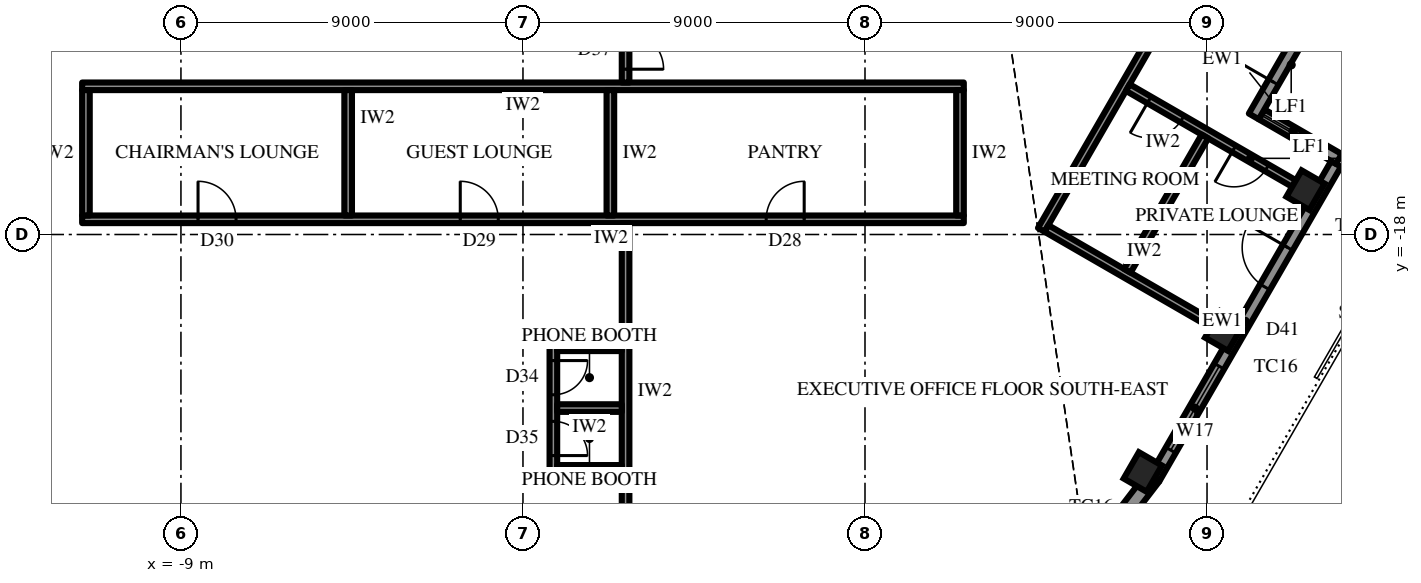
"""IFC4 building model, lengths in metres.
Left out: names, types, materials, properties, quantities, classifications, styles, units other than length and angle.
Written with IfcOpenShell. Run it as: python <this file> out.ifc"""

import sys

from ifc_helpers import new_model, si_unit, direction, frame, frame_2d, origin, origin_2d, place, context, subcontext, project, spatial, polyline, rectangle, outline, extrude, element, fill, save


model = new_model("IFC4")
c1 = context("Model", 3, precision=1e-05, world=origin(), true_north=direction((0.0, 1.0)))
c2 = subcontext(c1, "Body", "Model", "MODEL_VIEW")
j1 = project(units=[si_unit("LENGTHUNIT", "METRE"), si_unit("PLANEANGLEUNIT", "RADIAN")], contexts=[c1])
p1 = place(None, origin())
s1 = spatial("IfcSite", under=j1, at=p1, CompositionType="ELEMENT")
p2 = place(p1, origin())
s2 = spatial("IfcBuilding", under=s1, at=p2, CompositionType="ELEMENT")
p3 = place(p2, frame((0.0, 0.0, 382.9)))
s3 = spatial("IfcBuildingStorey", under=s2, at=p3, CompositionType="ELEMENT", Elevation=382.9)
for number, where, z_axis, x_axis in (
    (1, (16.31, -24.25, 0.0), (0.0, 0.0, 1.0), (0.5, 0.866, 0.0)),
    (2, (18.451, -20.542, 0.0), (0.0, 0.0, 1.0), (0.5, 0.866, 0.0)),
    (3, (20.592, -16.833, 0.0), (0.0, 0.0, 1.0), (0.5, 0.866, 0.0)),
):
    element("IfcColumn", number, at=place(p3, frame(where, z_axis=z_axis, x_axis=x_axis)), inside=s3, PredefinedType="COLUMN", context=c2, shape_type="SweptSolid", body=[
        extrude(rectangle(XDim=0.8, YDim=0.7, at=origin_2d()), origin(), (0.0, 0.0, 1.0), 4.2),
    ])
p4 = place(p3, origin())
e4 = element("IfcWall", 4, at=p4, inside=s3, PredefinedType="SOLIDWALL", context=c2, shape_type="SweptSolid", body=[
    extrude(outline(polyline([(12.846, -26.75), (14.011, -26.597), (15.096, -26.147), (16.028, -25.432), (16.743, -24.5), (16.397, -24.3), (15.745, -25.149), (14.896, -25.801), (13.907, -26.21), (12.846, -26.35), (12.846, -26.75)])), origin(), (0.0, 0.0, 1.0), 2.9),
])
p5 = place(p3, frame((16.613, -24.425, 0.0), z_axis=(0.0, 0.0, 1.0), x_axis=(0.499996453679, 0.866027451244, 0.0)))
e5 = element("IfcWall", 5, at=p5, inside=s3, PredefinedType="SOLIDWALL", context=c2, shape_type="SweptSolid", body=[
    extrude(rectangle(XDim=9.564, YDim=0.3, at=frame_2d((4.782, 0.0))), origin(), (0.0, 0.0, 1.0), 2.9),
])
p6 = place(p5, frame((0.866, 0.0, 0.6)))
e6 = element("IfcOpeningElement", 6, at=p6, cuts=e5, PredefinedType="OPENING", context=c2, shape_type="SweptSolid", body=[
    extrude(rectangle(XDim=2.55, YDim=2.05, at=frame_2d((1.275, 1.025))), frame((0.0, 0.16, 0.0), z_axis=(0.0, -1.0, 0.0), x_axis=(1.0, 0.0, 0.0)), (0.0, 0.0, 1.0), 0.32),
])
p7 = place(p5, frame((5.823, 0.0, 0.0)))
e7 = element("IfcOpeningElement", 7, at=p7, cuts=e5, PredefinedType="OPENING", context=c2, shape_type="SweptSolid", body=[
    extrude(rectangle(XDim=1.2, YDim=2.4, at=frame_2d((0.6, 1.2))), frame((0.0, 0.16, 0.0), z_axis=(0.0, -1.0, 0.0), x_axis=(1.0, 0.0, 0.0)), (0.0, 0.0, 1.0), 0.32),
])
p8 = place(p3, frame((21.47, -16.012, 0.0), z_axis=(0.0, 0.0, 1.0), x_axis=(-0.866016039709, 0.500016218704, 0.0)))
e8 = element("IfcWall", 8, at=p8, inside=s3, PredefinedType="SOLIDWALL", context=c2, shape_type="SweptSolid", body=[
    extrude(rectangle(XDim=2.35, YDim=0.3, at=frame_2d((1.175, 0.0))), origin(), (0.0, 0.0, 1.0), 2.9),
])
p9 = place(p3, frame((19.23, -14.892, 0.0), z_axis=(0.0, 0.0, 1.0), x_axis=(0.499999339774, 0.866025784966, 0.0)))
e9 = element("IfcWall", 9, at=p9, inside=s3, PredefinedType="SOLIDWALL", context=c2, shape_type="SweptSolid", body=[
    extrude(rectangle(XDim=6.564, YDim=0.3, at=frame_2d((3.282, 0.0))), origin(), (0.0, 0.0, 1.0), 2.9),
])
p10 = place(p9, frame((1.041, 0.0, 0.0)))
e10 = element("IfcOpeningElement", 10, at=p10, cuts=e9, PredefinedType="OPENING", context=c2, shape_type="SweptSolid", body=[
    extrude(rectangle(XDim=1.2, YDim=2.4, at=frame_2d((0.6, 1.2))), frame((0.0, 0.16, 0.0), z_axis=(0.0, -1.0, 0.0), x_axis=(1.0, 0.0, 0.0)), (0.0, 0.0, 1.0), 0.32),
])
p11 = place(p3, frame((11.6, -14.1, 0.0), z_axis=(0.0, 0.0, 1.0), x_axis=(-1.0, 0.0, 0.0)))
e11 = element("IfcWall", 11, at=p11, inside=s3, PredefinedType="PARTITIONING", context=c2, shape_type="SweptSolid", body=[
    extrude(rectangle(XDim=23.2, YDim=0.2, at=frame_2d((11.6, 0.0))), origin(), (0.0, 0.0, 1.0), 4.0),
])
p12 = place(p3, frame((11.6, -17.6, 0.0), z_axis=(0.0, 0.0, 1.0), x_axis=(-1.0, 0.0, 0.0)))
e12 = element("IfcWall", 12, at=p12, inside=s3, PredefinedType="PARTITIONING", context=c2, shape_type="SweptSolid", body=[
    extrude(rectangle(XDim=23.2, YDim=0.2, at=frame_2d((11.6, 0.0))), origin(), (0.0, 0.0, 1.0), 4.0),
])
p13 = place(p12, frame((4.2, 0.0, 0.0)))
e13 = element("IfcOpeningElement", 13, at=p13, cuts=e12, PredefinedType="OPENING", context=c2, shape_type="SweptSolid", body=[
    extrude(rectangle(XDim=1.0, YDim=2.2, at=frame_2d((0.5, 1.1))), frame((0.0, 0.11, 0.0), z_axis=(0.0, -1.0, 0.0), x_axis=(1.0, 0.0, 0.0)), (0.0, 0.0, 1.0), 0.22),
])
p14 = place(p12, frame((12.25, 0.0, 0.0)))
e14 = element("IfcOpeningElement", 14, at=p14, cuts=e12, PredefinedType="OPENING", context=c2, shape_type="SweptSolid", body=[
    extrude(rectangle(XDim=1.0, YDim=2.2, at=frame_2d((0.5, 1.1))), frame((0.0, 0.11, 0.0), z_axis=(0.0, -1.0, 0.0), x_axis=(1.0, 0.0, 0.0)), (0.0, 0.0, 1.0), 0.22),
])
p15 = place(p12, frame((19.15, 0.0, 0.0)))
e15 = element("IfcOpeningElement", 15, at=p15, cuts=e12, PredefinedType="OPENING", context=c2, shape_type="SweptSolid", body=[
    extrude(rectangle(XDim=1.0, YDim=2.2, at=frame_2d((0.5, 1.1))), frame((0.0, 0.11, 0.0), z_axis=(0.0, -1.0, 0.0), x_axis=(1.0, 0.0, 0.0)), (0.0, 0.0, 1.0), 0.22),
])
for number, where, z_axis, x_axis in (
    (16, (11.5, -14.2, 0.0), (0.0, 0.0, 1.0), (0.0, -1.0, 0.0)),
    (17, (2.3, -14.2, 0.0), (0.0, 0.0, 1.0), (0.0, -1.0, 0.0)),
    (18, (-4.6, -14.2, 0.0), (0.0, 0.0, 1.0), (0.0, -1.0, 0.0)),
    (19, (-11.5, -14.2, 0.0), (0.0, 0.0, 1.0), (0.0, -1.0, 0.0)),
):
    element("IfcWall", number, at=place(p3, frame(where, z_axis=z_axis, x_axis=x_axis)), inside=s3, PredefinedType="PARTITIONING", context=c2, shape_type="SweptSolid", body=[
        extrude(rectangle(XDim=3.3, YDim=0.2, at=frame_2d((1.65, 0.0))), origin(), (0.0, 0.0, 1.0), 4.0),
    ])
p16 = place(p3, frame((13.638, -17.878, 0.0), z_axis=(0.0, 0.0, 1.0), x_axis=(0.500006217173, 0.866021814268, 0.0)))
e20 = element("IfcWall", 20, at=p16, inside=s3, PredefinedType="PARTITIONING", context=c2, shape_type="SweptSolid", body=[
    extrude(rectangle(XDim=17.328, YDim=0.2, at=frame_2d((8.664, 0.0))), origin(), (0.0, 0.0, 1.0), 4.0),
])
p17 = place(p16, frame((8.164, 0.0, 0.0)))
e21 = element("IfcOpeningElement", 21, at=p17, cuts=e20, PredefinedType="OPENING", context=c2, shape_type="SweptSolid", body=[
    extrude(rectangle(XDim=1.0, YDim=2.2, at=frame_2d((0.5, 1.1))), frame((0.0, 0.11, 0.0), z_axis=(0.0, -1.0, 0.0), x_axis=(1.0, 0.0, 0.0)), (0.0, 0.0, 1.0), 0.22),
])
p18 = place(p3, frame((13.775, -17.842, 0.0), z_axis=(0.0, 0.0, 1.0), x_axis=(0.866006046928, -0.500033525561, 0.0)))
e22 = element("IfcWall", 22, at=p18, inside=s3, PredefinedType="PARTITIONING", context=c2, shape_type="SweptSolid", body=[
    extrude(rectangle(XDim=5.05, YDim=0.2, at=frame_2d((2.525, 0.0))), origin(), (0.0, 0.0, 1.0), 3.082),
])
p19 = place(p3, frame((15.916, -14.133, 0.0), z_axis=(0.0, 0.0, 1.0), x_axis=(0.866018134068, -0.500012591307, 0.0)))
e23 = element("IfcWall", 23, at=p19, inside=s3, PredefinedType="PARTITIONING", context=c2, shape_type="SweptSolid", body=[
    extrude(rectangle(XDim=5.05, YDim=0.2, at=frame_2d((2.525, 0.0))), origin(), (0.0, 0.0, 1.0), 3.082),
])
p20 = place(p19, frame((0.65, 0.0, 0.0)))
e24 = element("IfcOpeningElement", 24, at=p20, cuts=e23, PredefinedType="OPENING", context=c2, shape_type="SweptSolid", body=[
    extrude(rectangle(XDim=1.0, YDim=2.2, at=frame_2d((0.5, 1.1))), frame((0.0, 0.11, 0.0), z_axis=(0.0, -1.0, 0.0), x_axis=(1.0, 0.0, 0.0)), (0.0, 0.0, 1.0), 0.22),
])
p21 = place(p19, frame((3.225, 0.0, 0.0)))
e25 = element("IfcOpeningElement", 25, at=p21, cuts=e23, PredefinedType="OPENING", context=c2, shape_type="SweptSolid", body=[
    extrude(rectangle(XDim=1.0, YDim=2.2, at=frame_2d((0.5, 1.1))), frame((0.0, 0.11, 0.0), z_axis=(0.0, -1.0, 0.0), x_axis=(1.0, 0.0, 0.0)), (0.0, 0.0, 1.0), 0.22),
])
p22 = place(p3, frame((15.903, -18.955, 0.0), z_axis=(0.0, 0.0, 1.0), x_axis=(0.499998569178, 0.866026229868, 0.0)))
e26 = element("IfcWall", 26, at=p22, inside=s3, PredefinedType="PARTITIONING", context=c2, shape_type="SweptSolid", body=[
    extrude(rectangle(XDim=4.082, YDim=0.2, at=frame_2d((2.041, 0.0))), origin(), (0.0, 0.0, 1.0), 4.0),
])
p23 = place(p3, frame((2.7, -12.3, 0.0), z_axis=(0.0, 0.0, 1.0), x_axis=(0.0, -1.0, 0.0)))
e27 = element("IfcWall", 27, at=p23, inside=s3, PredefinedType="PARTITIONING", context=c2, shape_type="SweptSolid", body=[
    extrude(rectangle(XDim=1.7, YDim=0.2, at=frame_2d((0.85, 0.0))), origin(), (0.0, 0.0, 1.0), 4.0),
])
p24 = place(p23, frame((0.35, 0.0, 0.0)))
e28 = element("IfcOpeningElement", 28, at=p24, cuts=e27, PredefinedType="OPENING", context=c2, shape_type="SweptSolid", body=[
    extrude(rectangle(XDim=1.0, YDim=2.2, at=frame_2d((0.5, 1.1))), frame((0.0, 0.11, 0.0), z_axis=(0.0, -1.0, 0.0), x_axis=(1.0, 0.0, 0.0)), (0.0, 0.0, 1.0), 0.22),
])
p25 = place(p3, frame((2.7, -17.7, 0.0), z_axis=(0.0, 0.0, 1.0), x_axis=(0.0, -1.0, 0.0)))
e29 = element("IfcWall", 29, at=p25, inside=s3, PredefinedType="PARTITIONING", context=c2, shape_type="SweptSolid", body=[
    extrude(rectangle(XDim=8.85, YDim=0.2, at=frame_2d((4.425, 0.0))), origin(), (0.0, 0.0, 1.0), 4.0),
])
p26 = place(p3, frame((0.8, -20.867, 0.0), z_axis=(0.0, 0.0, 1.0), x_axis=(0.0, -1.0, 0.0)))
e30 = element("IfcWall", 30, at=p26, inside=s3, PredefinedType="PARTITIONING", context=c2, shape_type="SweptSolid", body=[
    extrude(rectangle(XDim=3.4, YDim=0.2, at=frame_2d((1.7, 0.0))), origin(), (0.0, 0.0, 1.0), 4.0),
])
p27 = place(p26, frame((0.45, 0.0, 0.0)))
e31 = element("IfcOpeningElement", 31, at=p27, cuts=e30, PredefinedType="OPENING", context=c2, shape_type="SweptSolid", body=[
    extrude(rectangle(XDim=0.9, YDim=2.2, at=frame_2d((0.45, 1.1))), frame((0.0, 0.11, 0.0), z_axis=(0.0, -1.0, 0.0), x_axis=(1.0, 0.0, 0.0)), (0.0, 0.0, 1.0), 0.22),
])
p28 = place(p26, frame((2.05, 0.0, 0.0)))
e32 = element("IfcOpeningElement", 32, at=p28, cuts=e30, PredefinedType="OPENING", context=c2, shape_type="SweptSolid", body=[
    extrude(rectangle(XDim=0.9, YDim=2.2, at=frame_2d((0.45, 1.1))), frame((0.0, 0.11, 0.0), z_axis=(0.0, -1.0, 0.0), x_axis=(1.0, 0.0, 0.0)), (0.0, 0.0, 1.0), 0.22),
])
for number, where, z_axis, x_axis in (
    (33, (2.6, -20.968, 0.0), (0.0, 0.0, 1.0), (-1.0, 0.0, 0.0)),
    (34, (2.6, -22.567, 0.0), (0.0, 0.0, 1.0), (-1.0, 0.0, 0.0)),
    (35, (2.6, -24.167, 0.0), (0.0, 0.0, 1.0), (-1.0, 0.0, 0.0)),
):
    element("IfcWall", number, at=place(p3, frame(where, z_axis=z_axis, x_axis=x_axis)), inside=s3, PredefinedType="PARTITIONING", context=c2, shape_type="SweptSolid", body=[
        extrude(rectangle(XDim=1.7, YDim=0.2, at=frame_2d((0.85, 0.0))), origin(), (0.0, 0.0, 1.0), 4.0),
    ])
p29 = place(p6, origin())
e36 = element("IfcWindow", 36, at=p29, inside=s3, PartitioningType="SINGLE_PANEL", PredefinedType="WINDOW", context=c2, shape_type="SweptSolid", body=[
    extrude(rectangle(XDim=2.55, YDim=2.05, at=frame_2d((1.275, 1.025))), frame((0.0, 0.03, 0.0), z_axis=(0.0, -1.0, 0.0), x_axis=(1.0, 0.0, 0.0)), (0.0, 0.0, 1.0), 0.06),
])
fill(e6, e36)
p30 = place(p7, origin())
e37 = element("IfcDoor", 37, at=p30, inside=s3, OperationType="SINGLE_SWING_LEFT", PredefinedType="DOOR", context=c2, shape_type="SweptSolid", body=[
    extrude(rectangle(XDim=1.2, YDim=2.4, at=frame_2d((0.6, 1.2))), frame((0.0, 0.025, 0.0), z_axis=(0.0, -1.0, 0.0), x_axis=(1.0, 0.0, 0.0)), (0.0, 0.0, 1.0), 0.05),
])
fill(e7, e37)
p31 = place(p10, origin())
e38 = element("IfcDoor", 38, at=p31, inside=s3, OperationType="SINGLE_SWING_RIGHT", PredefinedType="DOOR", context=c2, shape_type="SweptSolid", body=[
    extrude(rectangle(XDim=1.2, YDim=2.4, at=frame_2d((0.6, 1.2))), frame((0.0, 0.025, 0.0), z_axis=(0.0, -1.0, 0.0), x_axis=(1.0, 0.0, 0.0)), (0.0, 0.0, 1.0), 0.05),
])
fill(e10, e38)
p32 = place(p13, frame((1.0, 0.0, 0.0), z_axis=(0.0, 0.0, 1.0), x_axis=(-1.0, 0.0, 0.0)))
e39 = element("IfcDoor", 39, at=p32, inside=s3, OperationType="SINGLE_SWING_LEFT", PredefinedType="DOOR", context=c2, shape_type="SweptSolid", body=[
    extrude(rectangle(XDim=1.0, YDim=2.2, at=frame_2d((0.5, 1.1))), frame((0.0, 0.025, 0.0), z_axis=(0.0, -1.0, 0.0), x_axis=(1.0, 0.0, 0.0)), (0.0, 0.0, 1.0), 0.05),
])
fill(e13, e39)
p33 = place(p14, frame((1.0, 0.0, 0.0), z_axis=(0.0, 0.0, 1.0), x_axis=(-1.0, 0.0, 0.0)))
e40 = element("IfcDoor", 40, at=p33, inside=s3, OperationType="SINGLE_SWING_RIGHT", PredefinedType="DOOR", context=c2, shape_type="SweptSolid", body=[
    extrude(rectangle(XDim=1.0, YDim=2.2, at=frame_2d((0.5, 1.1))), frame((0.0, 0.025, 0.0), z_axis=(0.0, -1.0, 0.0), x_axis=(1.0, 0.0, 0.0)), (0.0, 0.0, 1.0), 0.05),
])
fill(e14, e40)
p34 = place(p15, frame((1.0, 0.0, 0.0), z_axis=(0.0, 0.0, 1.0), x_axis=(-1.0, 0.0, 0.0)))
e41 = element("IfcDoor", 41, at=p34, inside=s3, OperationType="SINGLE_SWING_RIGHT", PredefinedType="DOOR", context=c2, shape_type="SweptSolid", body=[
    extrude(rectangle(XDim=1.0, YDim=2.2, at=frame_2d((0.5, 1.1))), frame((0.0, 0.025, 0.0), z_axis=(0.0, -1.0, 0.0), x_axis=(1.0, 0.0, 0.0)), (0.0, 0.0, 1.0), 0.05),
])
fill(e15, e41)
p35 = place(p20, frame((1.0, 0.0, 0.0), z_axis=(0.0, 0.0, 1.0), x_axis=(-1.0, 0.0, 0.0)))
e42 = element("IfcDoor", 42, at=p35, inside=s3, OperationType="SINGLE_SWING_LEFT", PredefinedType="DOOR", context=c2, shape_type="SweptSolid", body=[
    extrude(rectangle(XDim=1.0, YDim=2.2, at=frame_2d((0.5, 1.1))), frame((0.0, 0.025, 0.0), z_axis=(0.0, -1.0, 0.0), x_axis=(1.0, 0.0, 0.0)), (0.0, 0.0, 1.0), 0.05),
])
fill(e24, e42)
p36 = place(p21, frame((1.0, 0.0, 0.0), z_axis=(0.0, 0.0, 1.0), x_axis=(-1.0, 0.0, 0.0)))
e43 = element("IfcDoor", 43, at=p36, inside=s3, OperationType="SINGLE_SWING_LEFT", PredefinedType="DOOR", context=c2, shape_type="SweptSolid", body=[
    extrude(rectangle(XDim=1.0, YDim=2.2, at=frame_2d((0.5, 1.1))), frame((0.0, 0.025, 0.0), z_axis=(0.0, -1.0, 0.0), x_axis=(1.0, 0.0, 0.0)), (0.0, 0.0, 1.0), 0.05),
])
fill(e25, e43)
p37 = place(p24, origin())
e44 = element("IfcDoor", 44, at=p37, inside=s3, OperationType="SINGLE_SWING_LEFT", PredefinedType="DOOR", context=c2, shape_type="SweptSolid", body=[
    extrude(rectangle(XDim=1.0, YDim=2.2, at=frame_2d((0.5, 1.1))), frame((0.0, 0.025, 0.0), z_axis=(0.0, -1.0, 0.0), x_axis=(1.0, 0.0, 0.0)), (0.0, 0.0, 1.0), 0.05),
])
fill(e28, e44)
p38 = place(p27, origin())
e45 = element("IfcDoor", 45, at=p38, inside=s3, OperationType="SINGLE_SWING_RIGHT", PredefinedType="DOOR", context=c2, shape_type="SweptSolid", body=[
    extrude(rectangle(XDim=0.9, YDim=2.2, at=frame_2d((0.45, 1.1))), frame((0.0, 0.025, 0.0), z_axis=(0.0, -1.0, 0.0), x_axis=(1.0, 0.0, 0.0)), (0.0, 0.0, 1.0), 0.05),
])
fill(e31, e45)
p39 = place(p28, origin())
e46 = element("IfcDoor", 46, at=p39, inside=s3, OperationType="SINGLE_SWING_LEFT", PredefinedType="DOOR", context=c2, shape_type="SweptSolid", body=[
    extrude(rectangle(XDim=0.9, YDim=2.2, at=frame_2d((0.45, 1.1))), frame((0.0, 0.025, 0.0), z_axis=(0.0, -1.0, 0.0), x_axis=(1.0, 0.0, 0.0)), (0.0, 0.0, 1.0), 0.05),
])
fill(e32, e46)
save(model, sys.argv[1])
